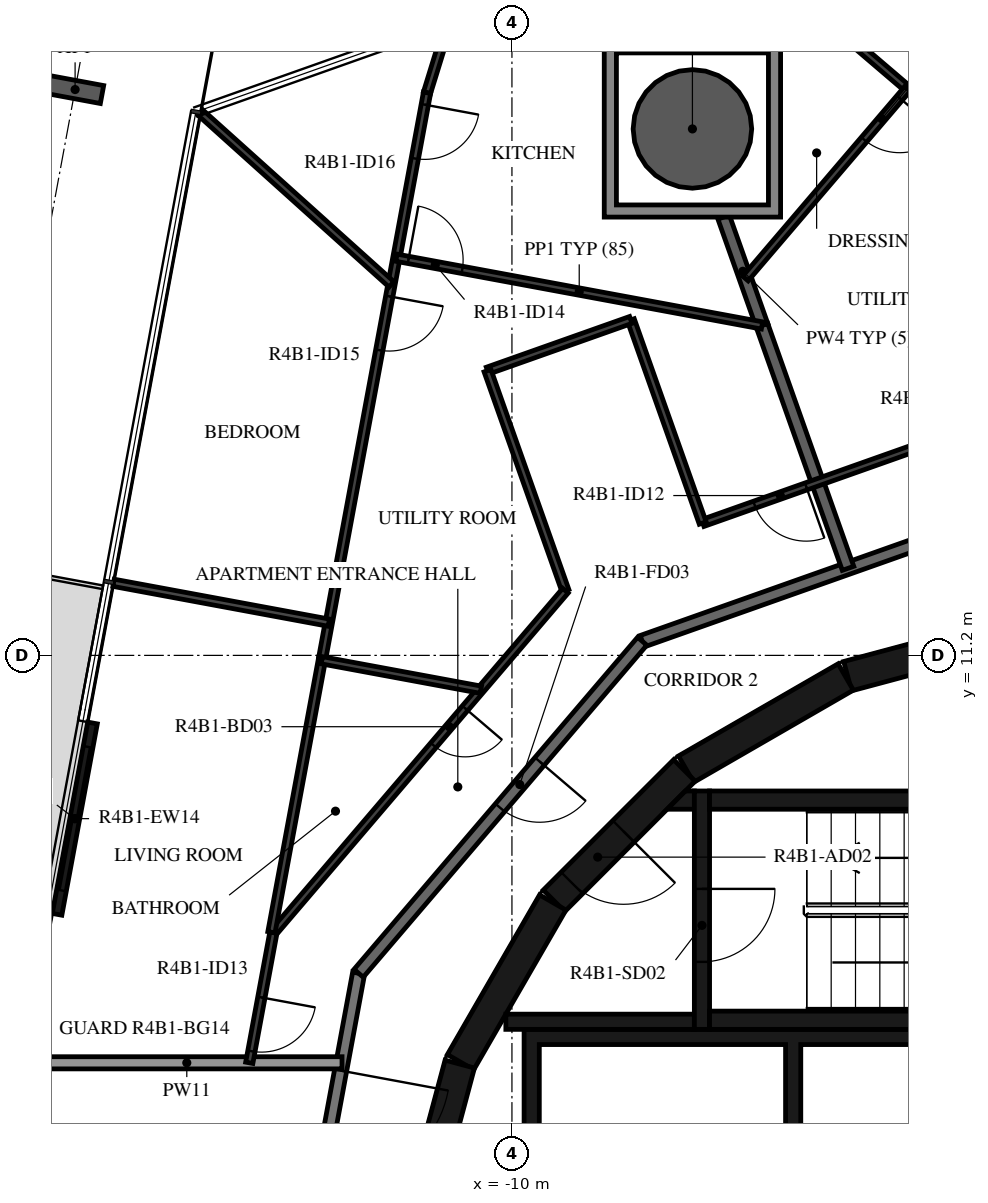
"""IFC4 building model, lengths in metres.
Left out: names, types, materials, properties, quantities, classifications, styles, units other than length and angle.
Written with IfcOpenShell. Run it as: python <this file> out.ifc"""

import sys

from ifc_helpers import new_model, si_unit, direction, frame, frame_2d, origin, origin_2d, place, context, subcontext, project, spatial, polyline, rectangle, hollow_circle, i_section, outline, extrude, element, fill, save


model = new_model("IFC4")
c1 = context("Model", 3, precision=1e-05, world=origin(), true_north=direction((0.0, 1.0)))
c2 = subcontext(c1, "Body", "Model", "MODEL_VIEW")
j1 = project(units=[si_unit("LENGTHUNIT", "METRE"), si_unit("PLANEANGLEUNIT", "RADIAN")], contexts=[c1])
p1 = place(None, origin())
s1 = spatial("IfcSite", under=j1, at=p1, CompositionType="ELEMENT")
p2 = place(p1, origin())
s2 = spatial("IfcBuilding", under=s1, at=p2, CompositionType="ELEMENT")
p3 = place(p2, frame((0.0, 0.0, 162.2)))
s3 = spatial("IfcBuildingStorey", under=s2, at=p3, CompositionType="ELEMENT", Elevation=162.2)
p4 = place(p3, frame((-7.032, 19.858, -0.38), z_axis=(0.0, 0.0, 1.0), x_axis=(1.0, 0.0, 0.0)))
e1 = element("IfcColumn", 1, at=p4, inside=s3, PredefinedType="COLUMN", context=c2, shape_type="SweptSolid", body=[
    extrude(hollow_circle(Radius=0.975, WallThickness=0.045, at=origin_2d()), origin(), (0.0, 0.0, 1.0), 3.5),
])
p5 = place(p3, frame((-17.184, 20.505, -0.38), z_axis=(0.0, 0.0, 1.0), x_axis=(0.182235967681, 0.983254825609, 0.0)))
e2 = element("IfcColumn", 2, at=p5, inside=s3, PredefinedType="COLUMN", context=c2, shape_type="SweptSolid", body=[
    extrude(i_section(OverallWidth=0.3, OverallDepth=0.9, WebThickness=0.019, FlangeThickness=0.035, FilletRadius=0.03, at=origin_2d()), origin(), (0.0, 0.0, 1.0), 3.5),
])
p6 = place(p3, frame((-16.897, 10.088, 0.0), z_axis=(0.0, 0.0, 1.0), x_axis=(-0.18226136951, -0.983250117307, 0.0)))
e3 = element("IfcWall", 3, at=p6, inside=s3, PredefinedType="STANDARD", context=c2, shape_type="SweptSolid", body=[
    extrude(rectangle(XDim=3.2, YDim=0.16, at=frame_2d((1.6, 0.0))), origin(), (0.0, 0.0, 1.0), 3.12),
])
p7 = place(p6, frame((0.4, 0.0, 0.0)))
e4 = element("IfcOpeningElement", 4, at=p7, cuts=e3, PredefinedType="OPENING", context=c2, shape_type="SweptSolid", body=[
    extrude(rectangle(XDim=2.4, YDim=2.4, at=frame_2d((1.2, 1.2))), frame((0.0, 0.09, 0.0), z_axis=(0.0, -1.0, 0.0), x_axis=(1.0, 0.0, 0.0)), (0.0, 0.0, 1.0), 0.18),
])
for number, where, z_axis, x_axis in (
    (5, (-1.55, 11.643, 0.0), (0.0, 0.0, 1.0), (-0.966, -0.259, 0.0)),
    (6, (-4.51, 10.845, 0.0), (0.0, 0.0, 1.0), (-0.866, -0.5, 0.0)),
):
    element("IfcWall", number, at=place(p3, frame(where, z_axis=z_axis, x_axis=x_axis)), inside=s3, PredefinedType="SHEAR", context=c2, shape_type="SweptSolid", body=[
        extrude(rectangle(XDim=3.033, YDim=0.5, at=frame_2d((1.516, 0.0))), origin(), (0.0, 0.0, 1.0), 3.12),
    ])
p8 = place(p3, frame((-7.164, 9.308, 0.0), z_axis=(0.0, 0.0, 1.0), x_axis=(-0.707106781187, -0.707106781187, 0.0)))
e7 = element("IfcWall", 7, at=p8, inside=s3, PredefinedType="SHEAR", context=c2, shape_type="SweptSolid", body=[
    extrude(rectangle(XDim=3.032, YDim=0.5, at=frame_2d((1.516, 0.0))), origin(), (0.0, 0.0, 1.0), 3.12),
])
p9 = place(p8, frame((1.416, 0.0, 0.0)))
e8 = element("IfcOpeningElement", 8, at=p9, cuts=e7, PredefinedType="OPENING", context=c2, shape_type="SweptSolid", body=[
    extrude(rectangle(XDim=1.2, YDim=2.1, at=frame_2d((0.6, 1.05))), frame((0.0, 0.26, 0.0), z_axis=(0.0, -1.0, 0.0), x_axis=(1.0, 0.0, 0.0)), (0.0, 0.0, 1.0), 0.52),
])
for number, where, z_axis, x_axis in (
    (9, (-9.329, 7.137, 0.0), (0.0, 0.0, 1.0), (-0.5, -0.866, 0.0)),
    (10, (-10.858, 4.479, 0.0), (0.0, 0.0, 1.0), (-0.259, -0.966, 0.0)),
):
    element("IfcWall", number, at=place(p3, frame(where, z_axis=z_axis, x_axis=x_axis)), inside=s3, PredefinedType="SHEAR", context=c2, shape_type="SweptSolid", body=[
        extrude(rectangle(XDim=3.033, YDim=0.5, at=frame_2d((1.516, 0.0))), origin(), (0.0, 0.0, 1.0), 3.12),
    ])
for number, where, z_axis, x_axis in (
    (11, (-6.75, 5.2, 0.0), (0.0, 0.0, 1.0), (1.0, 0.0, 0.0)),
    (12, (-6.75, 8.82, 0.0), (0.0, 0.0, 1.0), (1.0, 0.0, 0.0)),
):
    element("IfcWall", number, at=place(p3, frame(where, z_axis=z_axis, x_axis=x_axis)), inside=s3, PredefinedType="SHEAR", context=c2, shape_type="SweptSolid", body=[
        extrude(rectangle(XDim=6.75, YDim=0.3, at=frame_2d((3.375, 0.0))), origin(), (0.0, 0.0, 1.0), 3.12),
    ])
p10 = place(p3, frame((-6.875, 8.97, 0.0), z_axis=(0.0, 0.0, 1.0), x_axis=(0.0, -1.0, 0.0)))
e13 = element("IfcWall", 13, at=p10, inside=s3, PredefinedType="SHEAR", context=c2, shape_type="SweptSolid", body=[
    extrude(rectangle(XDim=3.92, YDim=0.25, at=frame_2d((1.96, 0.0))), origin(), (0.0, 0.0, 1.0), 3.12),
])
p11 = place(p10, frame((1.61, 0.0, 0.0)))
e14 = element("IfcOpeningElement", 14, at=p11, cuts=e13, PredefinedType="OPENING", context=c2, shape_type="SweptSolid", body=[
    extrude(rectangle(XDim=1.2, YDim=2.1, at=frame_2d((0.6, 1.05))), frame((0.0, 0.135, 0.0), z_axis=(0.0, -1.0, 0.0), x_axis=(1.0, 0.0, 0.0)), (0.0, 0.0, 1.0), 0.27),
])
p12 = place(p3, frame((-7.0, 5.175, 0.0), z_axis=(0.0, 0.0, 1.0), x_axis=(-1.0, 0.0, 0.0)))
e15 = element("IfcWall", 15, at=p12, inside=s3, PredefinedType="SHEAR", context=c2, shape_type="SweptSolid", body=[
    extrude(rectangle(XDim=3.1, YDim=0.25, at=frame_2d((1.55, 0.0))), origin(), (0.0, 0.0, 1.0), 3.12),
])
p13 = place(p3, origin())
e16 = element("IfcWall", 16, at=p13, inside=s3, PredefinedType="SHEAR", context=c2, shape_type="SweptSolid", body=[
    extrude(outline(polyline([(-7.148, 8.97), (-7.0, 8.97), (-7.0, 8.67), (-7.448, 8.67), (-7.148, 8.97)])), origin(), (0.0, 0.0, 1.0), 3.12),
])
p14 = place(p3, origin())
e17 = element("IfcWall", 17, at=p14, inside=s3, PredefinedType="SHEAR", context=c2, shape_type="SweptSolid", body=[
    extrude(outline(polyline([(-9.55, 4.8), (-5.5, 4.8), (-5.5, 1.9), (-5.25, 1.9), (-5.25, 4.8), (-1.2, 4.8), (-1.2, 1.9), (-0.95, 1.9), (-0.95, 4.8), (0.95, 4.8), (0.95, 1.9), (1.2, 1.9), (1.2, 4.8), (3.1, 4.8), (3.1, 1.9), (3.35, 1.9), (3.35, 4.8), (5.25, 4.8), (5.25, 1.9), (5.5, 1.9), (5.5, 4.8), (7.4, 4.8), (7.4, 1.9), (7.65, 1.9), (7.65, 4.8), (9.55, 4.8), (9.55, 1.9), (9.8, 1.9), (9.8, 4.8), (9.8, 5.05), (-9.8, 5.05), (-9.8, 4.8), (-9.8, 1.9), (-9.55, 1.9), (-9.55, 4.8)])), origin(), (0.0, 0.0, 1.0), 3.12),
])
p15 = place(p3, frame((-12.521, 5.972, 0.0), z_axis=(0.0, 0.0, 1.0), x_axis=(-0.182251559718, -0.983251935661, 0.0)))
e18 = element("IfcWall", 18, at=p15, inside=s3, PredefinedType="STANDARD", context=c2, shape_type="SweptSolid", body=[
    extrude(rectangle(XDim=5.117, YDim=0.2, at=frame_2d((2.559, 0.0))), origin(), (0.0, 0.0, 1.0), 3.12),
])
p16 = place(p15, frame((1.627, 0.0, 0.0)))
e19 = element("IfcOpeningElement", 19, at=p16, cuts=e18, PredefinedType="OPENING", context=c2, shape_type="SweptSolid", body=[
    extrude(rectangle(XDim=1.8, YDim=2.1, at=frame_2d((0.9, 1.05))), frame((0.0, 0.11, 0.0), z_axis=(0.0, -1.0, 0.0), x_axis=(1.0, 0.0, 0.0)), (0.0, 0.0, 1.0), 0.22),
])
p17 = place(p3, frame((-2.359, 13.38, 0.0), z_axis=(0.0, 0.0, 1.0), x_axis=(-0.942647529236, -0.333789807551, 0.0)))
e20 = element("IfcWall", 20, at=p17, inside=s3, PredefinedType="STANDARD", context=c2, shape_type="SweptSolid", body=[
    extrude(rectangle(XDim=5.833, YDim=0.2, at=frame_2d((2.917, 0.0))), origin(), (0.0, 0.0, 1.0), 3.12),
])
p18 = place(p3, frame((-7.858, 11.433, 0.0), z_axis=(0.0, 0.0, 1.0), x_axis=(-0.649440801937, -0.760412154545, 0.0)))
e21 = element("IfcWall", 21, at=p18, inside=s3, PredefinedType="STANDARD", context=c2, shape_type="SweptSolid", body=[
    extrude(rectangle(XDim=7.181, YDim=0.2, at=frame_2d((3.59, 0.0))), origin(), (0.0, 0.0, 1.0), 3.12),
])
p19 = place(p18, frame((2.6, 0.0, 0.0)))
e22 = element("IfcOpeningElement", 22, at=p19, cuts=e21, PredefinedType="OPENING", context=c2, shape_type="SweptSolid", body=[
    extrude(rectangle(XDim=1.0, YDim=2.1, at=frame_2d((0.5, 1.05))), frame((0.0, 0.11, 0.0), z_axis=(0.0, -1.0, 0.0), x_axis=(1.0, 0.0, 0.0)), (0.0, 0.0, 1.0), 0.22),
])
p20 = place(p3, frame((-12.794, 4.5, 0.0), z_axis=(0.0, 0.0, 1.0), x_axis=(-1.0, 0.0, 0.0)))
e23 = element("IfcWall", 23, at=p20, inside=s3, PredefinedType="STANDARD", context=c2, shape_type="SweptSolid", body=[
    extrude(rectangle(XDim=5.106, YDim=0.2, at=frame_2d((2.553, 0.0))), origin(), (0.0, 0.0, 1.0), 2.73),
])
p21 = place(p3, frame((-5.887, 16.626, 0.0), z_axis=(0.0, 0.0, 1.0), x_axis=(0.333820478853, -0.942636668021, 0.0)))
e24 = element("IfcWall", 24, at=p21, inside=s3, PredefinedType="STANDARD", context=c2, shape_type="SweptSolid", body=[
    extrude(rectangle(XDim=4.238, YDim=0.2, at=frame_2d((2.119, 0.0))), origin(), (0.0, 0.0, 1.0), 3.12),
])
p22 = place(p3, frame((-6.518, 18.408, 0.0), z_axis=(0.0, 0.0, 1.0), x_axis=(0.333725210903, -0.942670400303, 0.0)))
e25 = element("IfcWall", 25, at=p22, inside=s3, PredefinedType="STANDARD", context=c2, shape_type="SweptSolid", body=[
    extrude(rectangle(XDim=1.89, YDim=0.2, at=frame_2d((0.945, 0.0))), origin(), (0.0, 0.0, 1.0), 3.12),
])
p23 = place(p3, frame((-1.21, 15.378, 0.0), z_axis=(0.0, 0.0, 1.0), x_axis=(-0.9426440416, -0.333799656734, 0.0)))
e26 = element("IfcWall", 26, at=p23, inside=s3, PredefinedType="PARTITIONING", context=c2, shape_type="SweptSolid", body=[
    extrude(rectangle(XDim=5.996, YDim=0.12, at=frame_2d((2.998, 0.0))), origin(), (0.0, 0.0, 1.0), 3.12),
])
p24 = place(p23, frame((1.075, 0.0, 0.0)))
e27 = element("IfcOpeningElement", 27, at=p24, cuts=e26, PredefinedType="OPENING", context=c2, shape_type="SweptSolid", body=[
    extrude(rectangle(XDim=0.9, YDim=2.1, at=frame_2d((0.45, 1.05))), frame((0.0, 0.07, 0.0), z_axis=(0.0, -1.0, 0.0), x_axis=(1.0, 0.0, 0.0)), (0.0, 0.0, 1.0), 0.14),
])
p25 = place(p23, frame((4.192, 0.0, 0.0)))
e28 = element("IfcOpeningElement", 28, at=p25, cuts=e26, PredefinedType="OPENING", context=c2, shape_type="SweptSolid", body=[
    extrude(rectangle(XDim=0.9, YDim=2.1, at=frame_2d((0.45, 1.05))), frame((0.0, 0.07, 0.0), z_axis=(0.0, -1.0, 0.0), x_axis=(1.0, 0.0, 0.0)), (0.0, 0.0, 1.0), 0.14),
])
p26 = place(p3, frame((-4.983, 21.79, 0.0), z_axis=(0.0, 0.0, 1.0), x_axis=(0.760399838428, -0.649455222258, 0.0)))
e29 = element("IfcWall", 29, at=p26, inside=s3, PredefinedType="PARTITIONING", context=c2, shape_type="SweptSolid", body=[
    extrude(rectangle(XDim=11.234, YDim=0.12, at=frame_2d((5.617, 0.0))), origin(), (0.0, 0.0, 1.0), 3.12),
])
p27 = place(p3, frame((-3.495, 20.519, 0.0), z_axis=(0.0, 0.0, 1.0), x_axis=(-0.649433550281, -0.760418347865, 0.0)))
e30 = element("IfcWall", 30, at=p27, inside=s3, PredefinedType="PARTITIONING", context=c2, shape_type="SweptSolid", body=[
    extrude(rectangle(XDim=4.105, YDim=0.12, at=frame_2d((2.052, 0.0))), origin(), (0.0, 0.0, 1.0), 3.12),
])
p28 = place(p27, frame((0.2, 0.0, 0.0)))
e31 = element("IfcOpeningElement", 31, at=p28, cuts=e30, PredefinedType="OPENING", context=c2, shape_type="SweptSolid", body=[
    extrude(rectangle(XDim=0.9, YDim=2.1, at=frame_2d((0.45, 1.05))), frame((0.0, 0.07, 0.0), z_axis=(0.0, -1.0, 0.0), x_axis=(1.0, 0.0, 0.0)), (0.0, 0.0, 1.0), 0.14),
])
p29 = place(p3, frame((-6.862, 13.377, 0.0), z_axis=(0.0, 0.0, 1.0), x_axis=(-0.333868827671, 0.942619544625, 0.0)))
e32 = element("IfcWall", 32, at=p29, inside=s3, PredefinedType="PARTITIONING", context=c2, shape_type="SweptSolid", body=[
    extrude(rectangle(XDim=3.543, YDim=0.12, at=frame_2d((1.771, 0.0))), origin(), (0.0, 0.0, 1.0), 3.12),
])
p30 = place(p3, frame((-8.045, 16.716, 0.0), z_axis=(0.0, 0.0, 1.0), x_axis=(-0.942640030216, -0.333810984592, 0.0)))
e33 = element("IfcWall", 33, at=p30, inside=s3, PredefinedType="PARTITIONING", context=c2, shape_type="SweptSolid", body=[
    extrude(rectangle(XDim=2.5, YDim=0.12, at=frame_2d((1.25, 0.0))), origin(), (0.0, 0.0, 1.0), 3.12),
])
p31 = place(p3, frame((-10.402, 15.882, 0.0), z_axis=(0.0, 0.0, 1.0), x_axis=(0.33382476952, -0.942635148536, 0.0)))
e34 = element("IfcWall", 34, at=p31, inside=s3, PredefinedType="PARTITIONING", context=c2, shape_type="SweptSolid", body=[
    extrude(rectangle(XDim=3.838, YDim=0.12, at=frame_2d((1.919, 0.0))), origin(), (0.0, 0.0, 1.0), 3.12),
])
p32 = place(p3, frame((-9.12, 12.264, 0.0), z_axis=(0.0, 0.0, 1.0), x_axis=(-0.649444490942, -0.760409003882, 0.0)))
e35 = element("IfcWall", 35, at=p32, inside=s3, PredefinedType="PARTITIONING", context=c2, shape_type="SweptSolid", body=[
    extrude(rectangle(XDim=7.395, YDim=0.12, at=frame_2d((3.697, 0.0))), origin(), (0.0, 0.0, 1.0), 3.12),
])
p33 = place(p32, frame((2.542, 0.0, 0.0)))
e36 = element("IfcOpeningElement", 36, at=p33, cuts=e35, PredefinedType="OPENING", context=c2, shape_type="SweptSolid", body=[
    extrude(rectangle(XDim=0.8, YDim=2.1, at=frame_2d((0.4, 1.05))), frame((0.0, 0.07, 0.0), z_axis=(0.0, -1.0, 0.0), x_axis=(1.0, 0.0, 0.0)), (0.0, 0.0, 1.0), 0.14),
])
p34 = place(p3, frame((-13.923, 6.641, 0.0), z_axis=(0.0, 0.0, 1.0), x_axis=(-0.182209715759, -0.983259690765, 0.0)))
e37 = element("IfcWall", 37, at=p34, inside=s3, PredefinedType="PARTITIONING", context=c2, shape_type="SweptSolid", body=[
    extrude(rectangle(XDim=2.177, YDim=0.12, at=frame_2d((1.089, 0.0))), origin(), (0.0, 0.0, 1.0), 3.12),
])
p35 = place(p34, frame((1.083, 0.0, 0.0)))
e38 = element("IfcOpeningElement", 38, at=p35, cuts=e37, PredefinedType="OPENING", context=c2, shape_type="SweptSolid", body=[
    extrude(rectangle(XDim=0.9, YDim=2.1, at=frame_2d((0.45, 1.05))), frame((0.0, 0.07, 0.0), z_axis=(0.0, -1.0, 0.0), x_axis=(1.0, 0.0, 0.0)), (0.0, 0.0, 1.0), 0.14),
])
p36 = place(p3, frame((-13.955, 6.647, 0.0), z_axis=(0.0, 0.0, 1.0), x_axis=(0.182264522222, 0.983249532896, 0.0)))
e39 = element("IfcWall", 39, at=p36, inside=s3, PredefinedType="PARTITIONING", context=c2, shape_type="SweptSolid", body=[
    extrude(rectangle(XDim=4.589, YDim=0.12, at=frame_2d((2.294, 0.0))), origin(), (0.0, 0.0, 1.0), 3.12),
])
p37 = place(p3, frame((-11.034, 21.625, 0.0), z_axis=(0.0, 0.0, 1.0), x_axis=(-0.295260042089, -0.955416928647, 0.0)))
e40 = element("IfcWall", 40, at=p37, inside=s3, PredefinedType="PARTITIONING", context=c2, shape_type="SweptSolid", body=[
    extrude(rectangle(XDim=1.227, YDim=0.12, at=frame_2d((0.614, 0.0))), origin(), (0.0, 0.0, 1.0), 3.12),
])
p38 = place(p3, frame((-11.396, 20.453, 0.0), z_axis=(0.0, 0.0, 1.0), x_axis=(-0.182223370439, -0.983257160292, 0.0)))
e41 = element("IfcWall", 41, at=p38, inside=s3, PredefinedType="PARTITIONING", context=c2, shape_type="SweptSolid", body=[
    extrude(rectangle(XDim=9.452, YDim=0.12, at=frame_2d((4.726, 0.0))), origin(), (0.0, 0.0, 1.0), 3.12),
])
p39 = place(p38, frame((3.406, 0.0, 0.0)))
e42 = element("IfcOpeningElement", 42, at=p39, cuts=e41, PredefinedType="OPENING", context=c2, shape_type="SweptSolid", body=[
    extrude(rectangle(XDim=0.9, YDim=2.1, at=frame_2d((0.45, 1.05))), frame((0.0, 0.07, 0.0), z_axis=(0.0, -1.0, 0.0), x_axis=(1.0, 0.0, 0.0)), (0.0, 0.0, 1.0), 0.14),
])
p40 = place(p38, frame((0.2, 0.0, 0.0)))
e43 = element("IfcOpeningElement", 43, at=p40, cuts=e41, PredefinedType="OPENING", context=c2, shape_type="SweptSolid", body=[
    extrude(rectangle(XDim=0.9, YDim=2.1, at=frame_2d((0.45, 1.05))), frame((0.0, 0.07, 0.0), z_axis=(0.0, -1.0, 0.0), x_axis=(1.0, 0.0, 0.0)), (0.0, 0.0, 1.0), 0.14),
])
p41 = place(p3, frame((-11.899, 17.74, 0.0), z_axis=(0.0, 0.0, 1.0), x_axis=(0.983254721409, -0.182236529889, 0.0)))
e44 = element("IfcWall", 44, at=p41, inside=s3, PredefinedType="PARTITIONING", context=c2, shape_type="SweptSolid", body=[
    extrude(rectangle(XDim=6.114, YDim=0.12, at=frame_2d((3.057, 0.0))), origin(), (0.0, 0.0, 1.0), 3.12),
])
p42 = place(p41, frame((0.2, 0.0, 0.0)))
e45 = element("IfcOpeningElement", 45, at=p42, cuts=e44, PredefinedType="OPENING", context=c2, shape_type="SweptSolid", body=[
    extrude(rectangle(XDim=0.9, YDim=2.1, at=frame_2d((0.45, 1.05))), frame((0.0, 0.07, 0.0), z_axis=(0.0, -1.0, 0.0), x_axis=(1.0, 0.0, 0.0)), (0.0, 0.0, 1.0), 0.14),
])
p43 = place(p3, frame((-15.119, 20.122, 0.0), z_axis=(0.0, 0.0, 1.0), x_axis=(0.743711124749, -0.668501131581, 0.0)))
e46 = element("IfcWall", 46, at=p43, inside=s3, PredefinedType="PARTITIONING", context=c2, shape_type="SweptSolid", body=[
    extrude(rectangle(XDim=4.22, YDim=0.12, at=frame_2d((2.11, 0.0))), origin(), (0.0, 0.0, 1.0), 3.12),
])
p44 = place(p3, frame((-13.126, 11.12, 0.0), z_axis=(0.0, 0.0, 1.0), x_axis=(0.983257646361, -0.182220747645, 0.0)))
e47 = element("IfcWall", 47, at=p44, inside=s3, PredefinedType="PARTITIONING", context=c2, shape_type="SweptSolid", body=[
    extrude(rectangle(XDim=2.659, YDim=0.12, at=frame_2d((1.33, 0.0))), origin(), (0.0, 0.0, 1.0), 3.12),
])
p45 = place(p3, frame((-16.552, 12.394, 0.0), z_axis=(0.0, 0.0, 1.0), x_axis=(0.983257712156, -0.182220392618, 0.0)))
e48 = element("IfcWall", 48, at=p45, inside=s3, PredefinedType="PARTITIONING", context=c2, shape_type="SweptSolid", body=[
    extrude(rectangle(XDim=3.6, YDim=0.12, at=frame_2d((1.8, 0.0))), origin(), (0.0, 0.0, 1.0), 2.73),
])
p46 = place(p3, origin())
e49 = element("IfcWall", 49, at=p46, inside=s3, PredefinedType="STANDARD", context=c2, shape_type="SweptSolid", body=[
    extrude(outline(polyline([(-5.582, 21.308), (-5.582, 18.408), (-8.482, 18.408), (-8.482, 21.308), (-5.582, 21.308)]), holes=[polyline([(-8.282, 18.608), (-5.782, 18.608), (-5.782, 21.108), (-8.282, 21.108), (-8.282, 18.608)])]), origin(), (0.0, 0.0, 1.0), 3.12),
])
p47 = place(p7, origin())
e50 = element("IfcDoor", 50, at=p47, inside=s3, OperationType="DOUBLE_DOOR_SLIDING", PredefinedType="DOOR", context=c2, shape_type="SweptSolid", body=[
    extrude(rectangle(XDim=2.4, YDim=2.4, at=frame_2d((1.2, 1.2))), frame((0.0, 0.025, 0.0), z_axis=(0.0, -1.0, 0.0), x_axis=(1.0, 0.0, 0.0)), (0.0, 0.0, 1.0), 0.05),
])
fill(e4, e50)
p48 = place(p11, origin())
e51 = element("IfcDoor", 51, at=p48, inside=s3, OperationType="SINGLE_SWING_LEFT", PredefinedType="DOOR", context=c2, shape_type="SweptSolid", body=[
    extrude(rectangle(XDim=1.2, YDim=2.1, at=frame_2d((0.6, 1.05))), frame((0.0, 0.025, 0.0), z_axis=(0.0, -1.0, 0.0), x_axis=(1.0, 0.0, 0.0)), (0.0, 0.0, 1.0), 0.05),
])
fill(e14, e51)
p49 = place(p9, origin())
e52 = element("IfcDoor", 52, at=p49, inside=s3, OperationType="SINGLE_SWING_RIGHT", PredefinedType="DOOR", context=c2, shape_type="SweptSolid", body=[
    extrude(rectangle(XDim=1.2, YDim=2.1, at=frame_2d((0.6, 1.05))), frame((0.0, 0.025, 0.0), z_axis=(0.0, -1.0, 0.0), x_axis=(1.0, 0.0, 0.0)), (0.0, 0.0, 1.0), 0.05),
])
fill(e8, e52)
p50 = place(p28, origin())
e53 = element("IfcDoor", 53, at=p50, inside=s3, OperationType="SINGLE_SWING_RIGHT", PredefinedType="DOOR", context=c2, shape_type="SweptSolid", body=[
    extrude(rectangle(XDim=0.9, YDim=2.1, at=frame_2d((0.45, 1.05))), frame((0.0, 0.025, 0.0), z_axis=(0.0, -1.0, 0.0), x_axis=(1.0, 0.0, 0.0)), (0.0, 0.0, 1.0), 0.05),
])
fill(e31, e53)
p51 = place(p19, origin())
e54 = element("IfcDoor", 54, at=p51, inside=s3, OperationType="SINGLE_SWING_LEFT", PredefinedType="DOOR", context=c2, shape_type="SweptSolid", body=[
    extrude(rectangle(XDim=1.0, YDim=2.1, at=frame_2d((0.5, 1.05))), frame((0.0, 0.025, 0.0), z_axis=(0.0, -1.0, 0.0), x_axis=(1.0, 0.0, 0.0)), (0.0, 0.0, 1.0), 0.05),
])
fill(e22, e54)
p52 = place(p25, origin())
e55 = element("IfcDoor", 55, at=p52, inside=s3, OperationType="SINGLE_SWING_LEFT", PredefinedType="DOOR", context=c2, shape_type="SweptSolid", body=[
    extrude(rectangle(XDim=0.9, YDim=2.1, at=frame_2d((0.45, 1.05))), frame((0.0, 0.025, 0.0), z_axis=(0.0, -1.0, 0.0), x_axis=(1.0, 0.0, 0.0)), (0.0, 0.0, 1.0), 0.05),
])
fill(e28, e55)
p53 = place(p33, origin())
e56 = element("IfcDoor", 56, at=p53, inside=s3, OperationType="SINGLE_SWING_LEFT", PredefinedType="DOOR", context=c2, shape_type="SweptSolid", body=[
    extrude(rectangle(XDim=0.8, YDim=2.1, at=frame_2d((0.4, 1.05))), frame((0.0, 0.025, 0.0), z_axis=(0.0, -1.0, 0.0), x_axis=(1.0, 0.0, 0.0)), (0.0, 0.0, 1.0), 0.05),
])
fill(e36, e56)
p54 = place(p35, origin())
e57 = element("IfcDoor", 57, at=p54, inside=s3, OperationType="SINGLE_SWING_LEFT", PredefinedType="DOOR", context=c2, shape_type="SweptSolid", body=[
    extrude(rectangle(XDim=0.9, YDim=2.1, at=frame_2d((0.45, 1.05))), frame((0.0, 0.025, 0.0), z_axis=(0.0, -1.0, 0.0), x_axis=(1.0, 0.0, 0.0)), (0.0, 0.0, 1.0), 0.05),
])
fill(e38, e57)
p55 = place(p42, origin())
e58 = element("IfcDoor", 58, at=p55, inside=s3, OperationType="SINGLE_SWING_LEFT", PredefinedType="DOOR", context=c2, shape_type="SweptSolid", body=[
    extrude(rectangle(XDim=0.9, YDim=2.1, at=frame_2d((0.45, 1.05))), frame((0.0, 0.025, 0.0), z_axis=(0.0, -1.0, 0.0), x_axis=(1.0, 0.0, 0.0)), (0.0, 0.0, 1.0), 0.05),
])
fill(e45, e58)
p56 = place(p39, origin())
e59 = element("IfcDoor", 59, at=p56, inside=s3, OperationType="SINGLE_SWING_LEFT", PredefinedType="DOOR", context=c2, shape_type="SweptSolid", body=[
    extrude(rectangle(XDim=0.9, YDim=2.1, at=frame_2d((0.45, 1.05))), frame((0.0, 0.025, 0.0), z_axis=(0.0, -1.0, 0.0), x_axis=(1.0, 0.0, 0.0)), (0.0, 0.0, 1.0), 0.05),
])
fill(e42, e59)
p57 = place(p40, origin())
e60 = element("IfcDoor", 60, at=p57, inside=s3, OperationType="SINGLE_SWING_LEFT", PredefinedType="DOOR", context=c2, shape_type="SweptSolid", body=[
    extrude(rectangle(XDim=0.9, YDim=2.1, at=frame_2d((0.45, 1.05))), frame((0.0, 0.025, 0.0), z_axis=(0.0, -1.0, 0.0), x_axis=(1.0, 0.0, 0.0)), (0.0, 0.0, 1.0), 0.05),
])
fill(e43, e60)
p58 = place(p16, origin())
e61 = element("IfcDoor", 61, at=p58, inside=s3, OperationType="DOUBLE_DOOR_SINGLE_SWING", PredefinedType="DOOR", context=c2, shape_type="SweptSolid", body=[
    extrude(rectangle(XDim=1.8, YDim=2.1, at=frame_2d((0.9, 1.05))), frame((0.0, 0.025, 0.0), z_axis=(0.0, -1.0, 0.0), x_axis=(1.0, 0.0, 0.0)), (0.0, 0.0, 1.0), 0.05),
])
fill(e19, e61)
save(model, sys.argv[1])
